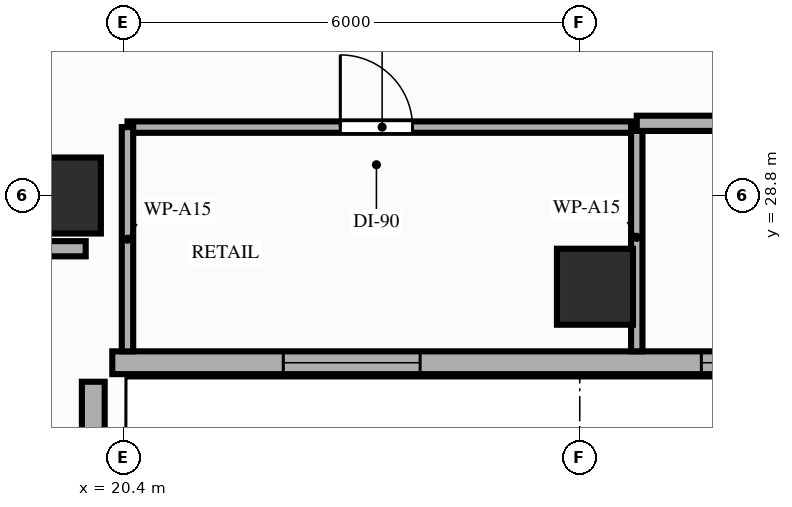
"""IFC4 building model, lengths in metres.
Left out: names, types, materials, properties, quantities, classifications, styles, units other than length and angle.
Written with IfcOpenShell. Run it as: python <this file> out.ifc"""

import sys

from ifc_helpers import new_model, si_unit, direction, frame, frame_2d, origin, origin_2d, place, context, subcontext, project, spatial, rectangle, extrude, element, fill, save


model = new_model("IFC4")
c1 = context("Model", 3, precision=1e-05, world=origin(), true_north=direction((0.0, 1.0)))
c2 = subcontext(c1, "Body", "Model", "MODEL_VIEW")
j1 = project(units=[si_unit("LENGTHUNIT", "METRE"), si_unit("PLANEANGLEUNIT", "RADIAN")], contexts=[c1])
p1 = place(None, origin())
s1 = spatial("IfcSite", under=j1, at=p1, CompositionType="ELEMENT")
p2 = place(p1, origin())
s2 = spatial("IfcBuilding", under=s1, at=p2, CompositionType="ELEMENT")
p3 = place(p2, frame((0.0, 0.0, 136.2)))
s3 = spatial("IfcBuildingStorey", under=s2, at=p3, CompositionType="ELEMENT", Elevation=136.2)
for number, where, z_axis, x_axis in (
    (1, (19.6, 28.8, 0.0), (0.0, 0.0, 1.0), (1.0, 0.0, 0.0)),
    (2, (26.6, 27.6, 0.0), (0.0, 0.0, 1.0), (1.0, 0.0, 0.0)),
):
    element("IfcColumn", number, at=place(p3, frame(where, z_axis=z_axis, x_axis=x_axis)), inside=s3, PredefinedType="COLUMN", context=c2, shape_type="SweptSolid", body=[
        extrude(rectangle(XDim=1.0, YDim=1.0, at=origin_2d()), origin(), (0.0, 0.0, 1.0), 3.2),
    ])
p4 = place(p3, frame((20.0, 8.8, 0.0), z_axis=(0.0, 0.0, 1.0), x_axis=(0.0, 1.0, 0.0)))
e3 = element("IfcWall", 3, at=p4, inside=s3, PredefinedType="STANDARD", context=c2, shape_type="SweptSolid", body=[
    extrude(rectangle(XDim=17.55, YDim=0.3, at=frame_2d((8.775, 0.0))), origin(), (0.0, 0.0, 1.0), 2.45),
])
p5 = place(p4, frame((5.95, 0.0, 0.85)))
e4 = element("IfcOpeningElement", 4, at=p5, cuts=e3, PredefinedType="OPENING", context=c2, shape_type="SweptSolid", body=[
    extrude(rectangle(XDim=1.8, YDim=1.35, at=frame_2d((0.9, 0.675))), frame((0.0, 0.16, 0.0), z_axis=(0.0, -1.0, 0.0), x_axis=(1.0, 0.0, 0.0)), (0.0, 0.0, 1.0), 0.32),
])
p6 = place(p4, frame((11.0, 0.0, 0.85)))
e5 = element("IfcOpeningElement", 5, at=p6, cuts=e3, PredefinedType="OPENING", context=c2, shape_type="SweptSolid", body=[
    extrude(rectangle(XDim=1.8, YDim=1.35, at=frame_2d((0.9, 0.675))), frame((0.0, 0.16, 0.0), z_axis=(0.0, -1.0, 0.0), x_axis=(1.0, 0.0, 0.0)), (0.0, 0.0, 1.0), 0.32),
])
p7 = place(p3, frame((20.25, 26.6, 0.0), z_axis=(0.0, 0.0, 1.0), x_axis=(1.0, 0.0, 0.0)))
e6 = element("IfcWall", 6, at=p7, inside=s3, PredefinedType="STANDARD", context=c2, shape_type="SweptSolid", body=[
    extrude(rectangle(XDim=26.15, YDim=0.3, at=frame_2d((13.075, 0.0))), origin(), (0.0, 0.0, 1.0), 2.71),
])
p8 = place(p7, frame((13.9, 0.0, 0.0)))
e7 = element("IfcOpeningElement", 7, at=p8, cuts=e6, PredefinedType="OPENING", context=c2, shape_type="SweptSolid", body=[
    extrude(rectangle(XDim=1.3, YDim=2.08, at=frame_2d((0.65, 1.04))), frame((0.0, 0.16, 0.0), z_axis=(0.0, -1.0, 0.0), x_axis=(1.0, 0.0, 0.0)), (0.0, 0.0, 1.0), 0.32),
])
p9 = place(p7, frame((2.25, 0.0, 0.85)))
e8 = element("IfcOpeningElement", 8, at=p9, cuts=e6, PredefinedType="OPENING", context=c2, shape_type="SweptSolid", body=[
    extrude(rectangle(XDim=1.8, YDim=1.61, at=frame_2d((0.9, 0.805))), frame((0.0, 0.16, 0.0), z_axis=(0.0, -1.0, 0.0), x_axis=(1.0, 0.0, 0.0)), (0.0, 0.0, 1.0), 0.32),
])
p10 = place(p7, frame((7.75, 0.0, 0.85)))
e9 = element("IfcOpeningElement", 9, at=p10, cuts=e6, PredefinedType="OPENING", context=c2, shape_type="SweptSolid", body=[
    extrude(rectangle(XDim=1.8, YDim=1.61, at=frame_2d((0.9, 0.805))), frame((0.0, 0.16, 0.0), z_axis=(0.0, -1.0, 0.0), x_axis=(1.0, 0.0, 0.0)), (0.0, 0.0, 1.0), 0.32),
])
p11 = place(p7, frame((22.25, 0.0, 0.85)))
e10 = element("IfcOpeningElement", 10, at=p11, cuts=e6, PredefinedType="OPENING", context=c2, shape_type="SweptSolid", body=[
    extrude(rectangle(XDim=1.8, YDim=1.61, at=frame_2d((0.9, 0.805))), frame((0.0, 0.16, 0.0), z_axis=(0.0, -1.0, 0.0), x_axis=(1.0, 0.0, 0.0)), (0.0, 0.0, 1.0), 0.32),
])
p12 = place(p3, frame((14.66, 28.1, 0.0), z_axis=(0.0, 0.0, 1.0), x_axis=(1.0, 0.0, 0.0)))
e11 = element("IfcWall", 11, at=p12, inside=s3, PredefinedType="PARTITIONING", context=c2, shape_type="SweptSolid", body=[
    extrude(rectangle(XDim=5.24, YDim=0.2, at=frame_2d((2.62, 0.0))), origin(), (0.0, 0.0, 1.0), 2.45),
])
p13 = place(p3, frame((20.45, 29.7, 0.0), z_axis=(0.0, 0.0, 1.0), x_axis=(1.0, 0.0, 0.0)))
e12 = element("IfcWall", 12, at=p13, inside=s3, PredefinedType="PARTITIONING", context=c2, shape_type="SweptSolid", body=[
    extrude(rectangle(XDim=6.7, YDim=0.15, at=frame_2d((3.35, 0.0))), origin(), (0.0, 0.0, 1.0), 3.02),
])
p14 = place(p13, frame((2.8, 0.0, 0.0)))
e13 = element("IfcOpeningElement", 13, at=p14, cuts=e12, PredefinedType="OPENING", context=c2, shape_type="SweptSolid", body=[
    extrude(rectangle(XDim=0.95, YDim=2.15, at=frame_2d((0.475, 1.075))), frame((0.0, 0.085, 0.0), z_axis=(0.0, -1.0, 0.0), x_axis=(1.0, 0.0, 0.0)), (0.0, 0.0, 1.0), 0.17),
])
p15 = place(p3, frame((20.45, 26.75, 0.0), z_axis=(0.0, 0.0, 1.0), x_axis=(0.0, 1.0, 0.0)))
e14 = element("IfcWall", 14, at=p15, inside=s3, PredefinedType="PARTITIONING", context=c2, shape_type="SweptSolid", body=[
    extrude(rectangle(XDim=2.95, YDim=0.15, at=frame_2d((1.475, 0.0))), origin(), (0.0, 0.0, 1.0), 2.45),
])
p16 = place(p3, frame((27.15, 26.75, 0.0), z_axis=(0.0, 0.0, 1.0), x_axis=(0.0, 1.0, 0.0)))
e15 = element("IfcWall", 15, at=p16, inside=s3, PredefinedType="PARTITIONING", context=c2, shape_type="SweptSolid", body=[
    extrude(rectangle(XDim=3.0, YDim=0.15, at=frame_2d((1.5, 0.0))), origin(), (0.0, 0.0, 1.0), 2.45),
])
p17 = place(p3, frame((27.15, 29.75, 0.0), z_axis=(0.0, 0.0, 1.0), x_axis=(1.0, 0.0, 0.0)))
e16 = element("IfcWall", 16, at=p17, inside=s3, PredefinedType="PARTITIONING", context=c2, shape_type="SweptSolid", body=[
    extrude(rectangle(XDim=13.95, YDim=0.2, at=frame_2d((6.975, 0.0))), origin(), (0.0, 0.0, 1.0), 2.45),
])
p18 = place(p17, frame((3.91, 0.0, 0.0)))
e17 = element("IfcOpeningElement", 17, at=p18, cuts=e16, PredefinedType="OPENING", context=c2, shape_type="SweptSolid", body=[
    extrude(rectangle(XDim=0.95, YDim=2.15, at=frame_2d((0.475, 1.075))), frame((0.0, 0.11, 0.0), z_axis=(0.0, -1.0, 0.0), x_axis=(1.0, 0.0, 0.0)), (0.0, 0.0, 1.0), 0.22),
])
p19 = place(p17, frame((10.89, 0.0, 0.0)))
e18 = element("IfcOpeningElement", 18, at=p19, cuts=e16, PredefinedType="OPENING", context=c2, shape_type="SweptSolid", body=[
    extrude(rectangle(XDim=0.95, YDim=2.15, at=frame_2d((0.475, 1.075))), frame((0.0, 0.11, 0.0), z_axis=(0.0, -1.0, 0.0), x_axis=(1.0, 0.0, 0.0)), (0.0, 0.0, 1.0), 0.22),
])
p20 = place(p9, origin())
e19 = element("IfcWindow", 19, at=p20, inside=s3, PartitioningType="SINGLE_PANEL", PredefinedType="WINDOW", context=c2, shape_type="SweptSolid", body=[
    extrude(rectangle(XDim=1.8, YDim=1.61, at=frame_2d((0.9, 0.805))), frame((0.0, 0.03, 0.0), z_axis=(0.0, -1.0, 0.0), x_axis=(1.0, 0.0, 0.0)), (0.0, 0.0, 1.0), 0.06),
])
fill(e8, e19)
p21 = place(p10, origin())
e20 = element("IfcWindow", 20, at=p21, inside=s3, PartitioningType="SINGLE_PANEL", PredefinedType="WINDOW", context=c2, shape_type="SweptSolid", body=[
    extrude(rectangle(XDim=1.8, YDim=1.61, at=frame_2d((0.9, 0.805))), frame((0.0, 0.03, 0.0), z_axis=(0.0, -1.0, 0.0), x_axis=(1.0, 0.0, 0.0)), (0.0, 0.0, 1.0), 0.06),
])
fill(e9, e20)
p22 = place(p14, origin())
e21 = element("IfcDoor", 21, at=p22, inside=s3, OperationType="SINGLE_SWING_LEFT", PredefinedType="DOOR", context=c2, shape_type="SweptSolid", body=[
    extrude(rectangle(XDim=0.95, YDim=2.15, at=frame_2d((0.475, 1.075))), frame((0.0, 0.025, 0.0), z_axis=(0.0, -1.0, 0.0), x_axis=(1.0, 0.0, 0.0)), (0.0, 0.0, 1.0), 0.05),
])
fill(e13, e21)
save(model, sys.argv[1])
